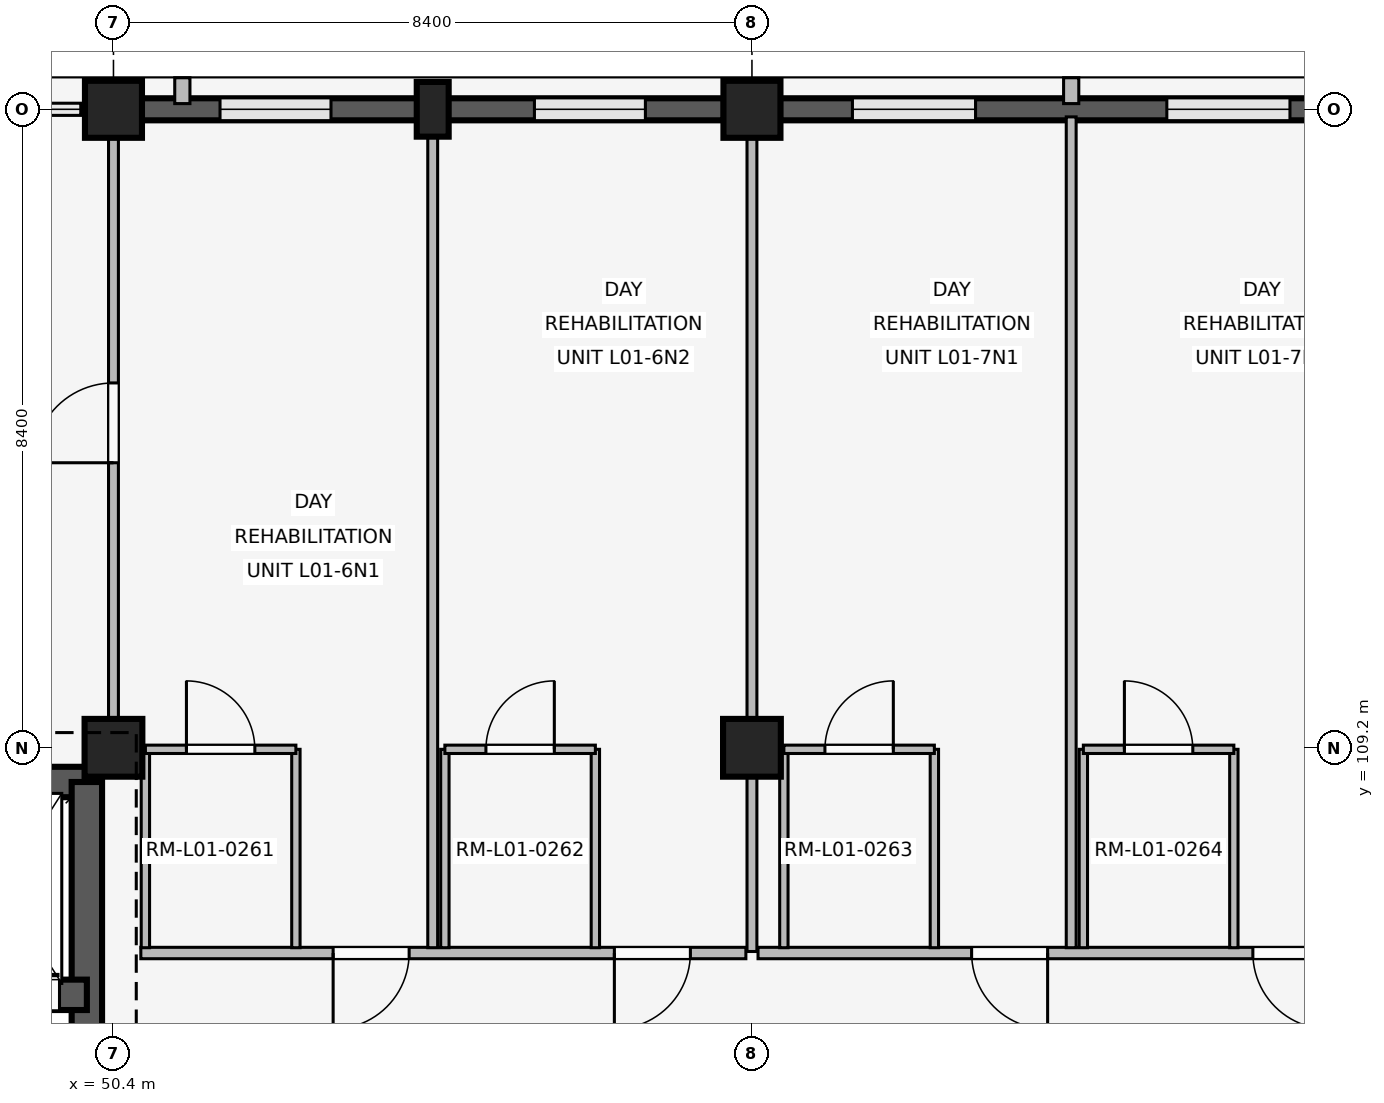
"""IFC4 building model, lengths in metres.
Left out: names, types, materials, properties, quantities, classifications, styles, units other than length and angle.
Written with IfcOpenShell. Run it as: python <this file> out.ifc"""

import sys

from ifc_helpers import new_model, si_unit, direction, frame, frame_2d, origin, origin_2d, place, context, subcontext, project, spatial, rectangle, extrude, element, fill, save


model = new_model("IFC4")
c1 = context("Model", 3, precision=1e-05, world=origin(), true_north=direction((0.0, 1.0)))
c2 = subcontext(c1, "Body", "Model", "MODEL_VIEW")
j1 = project(units=[si_unit("LENGTHUNIT", "METRE"), si_unit("PLANEANGLEUNIT", "RADIAN")], contexts=[c1])
p1 = place(None, origin())
s1 = spatial("IfcSite", under=j1, at=p1, CompositionType="ELEMENT")
p2 = place(p1, origin())
s2 = spatial("IfcBuilding", under=s1, at=p2, CompositionType="ELEMENT")
p3 = place(p2, frame((0.0, 0.0, 4.8)))
s3 = spatial("IfcBuildingStorey", under=s2, at=p3, CompositionType="ELEMENT", Elevation=4.8)
p4 = place(p3, frame((50.4, 109.2, 0.0), z_axis=(0.0, 0.0, 1.0), x_axis=(1.0, 0.0, 0.0)))
e1 = element("IfcColumn", 1, at=p4, inside=s3, PredefinedType="COLUMN", context=c2, shape_type="SweptSolid", body=[
    extrude(rectangle(XDim=0.76, YDim=0.76, at=origin_2d()), origin(), (0.0, 0.0, 1.0), 3.3),
])
p5 = place(p3, frame((50.4, 117.6, 0.0), z_axis=(0.0, 0.0, 1.0), x_axis=(1.0, 0.0, 0.0)))
e2 = element("IfcColumn", 2, at=p5, inside=s3, PredefinedType="COLUMN", context=c2, shape_type="SweptSolid", body=[
    extrude(rectangle(XDim=0.75, YDim=0.75, at=origin_2d()), origin(), (0.0, 0.0, 1.0), 3.3),
])
p6 = place(p3, frame((58.8, 109.2, 0.0), z_axis=(0.0, 0.0, 1.0), x_axis=(1.0, 0.0, 0.0)))
e3 = element("IfcColumn", 3, at=p6, inside=s3, PredefinedType="COLUMN", context=c2, shape_type="SweptSolid", body=[
    extrude(rectangle(XDim=0.76, YDim=0.76, at=origin_2d()), origin(), (0.0, 0.0, 1.0), 3.3),
])
p7 = place(p3, frame((58.8, 117.6, 0.0), z_axis=(0.0, 0.0, 1.0), x_axis=(1.0, 0.0, 0.0)))
e4 = element("IfcColumn", 4, at=p7, inside=s3, PredefinedType="COLUMN", context=c2, shape_type="SweptSolid", body=[
    extrude(rectangle(XDim=0.75, YDim=0.75, at=origin_2d()), origin(), (0.0, 0.0, 1.0), 3.3),
])
p8 = place(p3, frame((54.6, 117.6, 0.0), z_axis=(0.0, 0.0, 1.0), x_axis=(1.0, 0.0, 0.0)))
e5 = element("IfcColumn", 5, at=p8, inside=s3, PredefinedType="PILASTER", context=c2, shape_type="SweptSolid", body=[
    extrude(rectangle(XDim=0.42, YDim=0.72, at=origin_2d()), origin(), (0.0, 0.0, 1.0), 3.3),
])
p9 = place(p3, frame((50.77, 117.6, 0.0), z_axis=(0.0, 0.0, 1.0), x_axis=(1.0, 0.0, 0.0)))
e6 = element("IfcWall", 6, at=p9, inside=s3, PredefinedType="SOLIDWALL", context=c2, shape_type="SweptSolid", body=[
    extrude(rectangle(XDim=7.66, YDim=0.29, at=frame_2d((3.83, 0.0))), origin(), (0.0, 0.0, 1.0), 2.42),
])
p10 = place(p9, frame((1.032, 0.0, 0.85)))
e7 = element("IfcOpeningElement", 7, at=p10, cuts=e6, PredefinedType="OPENING", context=c2, shape_type="SweptSolid", body=[
    extrude(rectangle(XDim=1.46, YDim=0.85, at=frame_2d((0.73, 0.425))), frame((0.0, 0.155, 0.0), z_axis=(0.0, -1.0, 0.0), x_axis=(1.0, 0.0, 0.0)), (0.0, 0.0, 1.0), 0.31),
])
p11 = place(p9, frame((5.168, 0.0, 0.85)))
e8 = element("IfcOpeningElement", 8, at=p11, cuts=e6, PredefinedType="OPENING", context=c2, shape_type="SweptSolid", body=[
    extrude(rectangle(XDim=1.46, YDim=0.85, at=frame_2d((0.73, 0.425))), frame((0.0, 0.155, 0.0), z_axis=(0.0, -1.0, 0.0), x_axis=(1.0, 0.0, 0.0)), (0.0, 0.0, 1.0), 0.31),
])
p12 = place(p3, frame((51.306, 117.675, 0.0), z_axis=(0.0, 0.0, 1.0), x_axis=(0.0, 1.0, 0.0)))
e9 = element("IfcWall", 9, at=p12, inside=s3, PredefinedType="ELEMENTEDWALL", context=c2, shape_type="SweptSolid", body=[
    extrude(rectangle(XDim=0.34, YDim=0.2, at=frame_2d((0.17, 0.0))), origin(), (0.0, 0.0, 1.0), 2.4),
])
p13 = place(p3, frame((59.17, 117.6, 0.0), z_axis=(0.0, 0.0, 1.0), x_axis=(1.0, 0.0, 0.0)))
e10 = element("IfcWall", 10, at=p13, inside=s3, PredefinedType="SOLIDWALL", context=c2, shape_type="SweptSolid", body=[
    extrude(rectangle(XDim=7.66, YDim=0.29, at=frame_2d((3.83, 0.0))), origin(), (0.0, 0.0, 1.0), 2.42),
])
p14 = place(p13, frame((0.952, 0.0, 0.85)))
e11 = element("IfcOpeningElement", 11, at=p14, cuts=e10, PredefinedType="OPENING", context=c2, shape_type="SweptSolid", body=[
    extrude(rectangle(XDim=1.62, YDim=0.95, at=frame_2d((0.81, 0.475))), frame((0.0, 0.155, 0.0), z_axis=(0.0, -1.0, 0.0), x_axis=(1.0, 0.0, 0.0)), (0.0, 0.0, 1.0), 0.31),
])
p15 = place(p13, frame((5.088, 0.0, 0.85)))
e12 = element("IfcOpeningElement", 12, at=p15, cuts=e10, PredefinedType="OPENING", context=c2, shape_type="SweptSolid", body=[
    extrude(rectangle(XDim=1.62, YDim=0.95, at=frame_2d((0.81, 0.475))), frame((0.0, 0.155, 0.0), z_axis=(0.0, -1.0, 0.0), x_axis=(1.0, 0.0, 0.0)), (0.0, 0.0, 1.0), 0.31),
])
p16 = place(p3, frame((63.0, 117.675, 0.0), z_axis=(0.0, 0.0, 1.0), x_axis=(0.0, 1.0, 0.0)))
e13 = element("IfcWall", 13, at=p16, inside=s3, PredefinedType="ELEMENTEDWALL", context=c2, shape_type="SweptSolid", body=[
    extrude(rectangle(XDim=0.34, YDim=0.2, at=frame_2d((0.17, 0.0))), origin(), (0.0, 0.0, 1.0), 2.4),
])
p17 = place(p3, frame((42.55, 108.75, 0.0), z_axis=(0.0, 0.0, 1.0), x_axis=(1.0, 0.0, 0.0)))
e14 = element("IfcWall", 14, at=p17, inside=s3, PredefinedType="SHEAR", context=c2, shape_type="SweptSolid", body=[
    extrude(rectangle(XDim=7.5, YDim=0.4, at=frame_2d((3.75, 0.0))), origin(), (0.0, 0.0, 1.0), 3.02),
])
p18 = place(p3, frame((50.05, 101.2, 0.0), z_axis=(0.0, 0.0, 1.0), x_axis=(0.0, 1.0, 0.0)))
e15 = element("IfcWall", 15, at=p18, inside=s3, PredefinedType="SHEAR", context=c2, shape_type="SweptSolid", body=[
    extrude(rectangle(XDim=7.55, YDim=0.4, at=frame_2d((3.775, 0.0))), origin(), (0.0, 0.0, 1.0), 3.02),
])
p19 = place(p18, frame((2.4, 0.0, 0.0)))
e16 = element("IfcOpeningElement", 16, at=p19, cuts=e15, PredefinedType="OPENING", context=c2, shape_type="SweptSolid", body=[
    extrude(rectangle(XDim=1.2, YDim=2.2, at=frame_2d((0.6, 1.1))), frame((0.0, 0.21, 0.0), z_axis=(0.0, -1.0, 0.0), x_axis=(1.0, 0.0, 0.0)), (0.0, 0.0, 1.0), 0.42),
])
p20 = place(p3, frame((46.25, 105.95, 0.0), z_axis=(0.0, 0.0, 1.0), x_axis=(1.0, 0.0, 0.0)))
e17 = element("IfcWall", 17, at=p20, inside=s3, PredefinedType="SHEAR", context=c2, shape_type="SweptSolid", body=[
    extrude(rectangle(XDim=3.8, YDim=0.4, at=frame_2d((1.9, 0.0))), origin(), (0.0, 0.0, 1.0), 3.02),
])
p21 = place(p20, frame((0.32, 0.0, 0.0)))
e18 = element("IfcOpeningElement", 18, at=p21, cuts=e17, PredefinedType="OPENING", context=c2, shape_type="SweptSolid", body=[
    extrude(rectangle(XDim=1.35, YDim=2.25, at=frame_2d((0.675, 1.125))), frame((0.0, 0.21, 0.0), z_axis=(0.0, -1.0, 0.0), x_axis=(1.0, 0.0, 0.0)), (0.0, 0.0, 1.0), 0.42),
])
p22 = place(p20, frame((2.04, 0.0, 0.0)))
e19 = element("IfcOpeningElement", 19, at=p22, cuts=e17, PredefinedType="OPENING", context=c2, shape_type="SweptSolid", body=[
    extrude(rectangle(XDim=1.4, YDim=2.25, at=frame_2d((0.7, 1.125))), frame((0.0, 0.21, 0.0), z_axis=(0.0, -1.0, 0.0), x_axis=(1.0, 0.0, 0.0)), (0.0, 0.0, 1.0), 0.42),
])
p23 = place(p3, frame((50.4, 109.55, 0.0), z_axis=(0.0, 0.0, 1.0), x_axis=(0.0, 1.0, 0.0)))
e20 = element("IfcWall", 20, at=p23, inside=s3, PredefinedType="PARTITIONING", context=c2, shape_type="SweptSolid", body=[
    extrude(rectangle(XDim=7.91, YDim=0.13, at=frame_2d((3.955, 0.0))), origin(), (0.0, 0.0, 1.0), 2.4),
])
p24 = place(p23, frame((3.4, 0.0, 0.0)))
e21 = element("IfcOpeningElement", 21, at=p24, cuts=e20, PredefinedType="OPENING", context=c2, shape_type="SweptSolid", body=[
    extrude(rectangle(XDim=1.05, YDim=2.2, at=frame_2d((0.525, 1.1))), frame((0.0, 0.075, 0.0), z_axis=(0.0, -1.0, 0.0), x_axis=(1.0, 0.0, 0.0)), (0.0, 0.0, 1.0), 0.15),
])
p25 = place(p3, frame((58.72, 106.5, 0.0), z_axis=(0.0, 0.0, 1.0), x_axis=(-1.0, 0.0, 0.0)))
e22 = element("IfcWall", 22, at=p25, inside=s3, PredefinedType="PARTITIONING", context=c2, shape_type="SweptSolid", body=[
    extrude(rectangle(XDim=7.96, YDim=0.15, at=frame_2d((3.98, 0.0))), origin(), (0.0, 0.0, 1.0), 2.4),
])
p26 = place(p25, frame((0.73, 0.0, 0.0)))
e23 = element("IfcOpeningElement", 23, at=p26, cuts=e22, PredefinedType="OPENING", context=c2, shape_type="SweptSolid", body=[
    extrude(rectangle(XDim=1.0, YDim=2.15, at=frame_2d((0.5, 1.075))), frame((0.0, 0.085, 0.0), z_axis=(0.0, -1.0, 0.0), x_axis=(1.0, 0.0, 0.0)), (0.0, 0.0, 1.0), 0.17),
])
p27 = place(p25, frame((4.43, 0.0, 0.0)))
e24 = element("IfcOpeningElement", 24, at=p27, cuts=e22, PredefinedType="OPENING", context=c2, shape_type="SweptSolid", body=[
    extrude(rectangle(XDim=1.0, YDim=2.15, at=frame_2d((0.5, 1.075))), frame((0.0, 0.085, 0.0), z_axis=(0.0, -1.0, 0.0), x_axis=(1.0, 0.0, 0.0)), (0.0, 0.0, 1.0), 0.17),
])
p28 = place(p3, frame((54.6, 106.57, 0.0), z_axis=(0.0, 0.0, 1.0), x_axis=(0.0, 1.0, 0.0)))
e25 = element("IfcWall", 25, at=p28, inside=s3, PredefinedType="PARTITIONING", context=c2, shape_type="SweptSolid", body=[
    extrude(rectangle(XDim=10.93, YDim=0.13, at=frame_2d((5.465, 0.0))), origin(), (0.0, 0.0, 1.0), 2.4),
])
for number, where, z_axis, x_axis in (
    (26, (50.82, 106.57, 0.0), (0.0, 0.0, 1.0), (0.0, 1.0, 0.0)),
    (27, (52.8, 106.57, 0.0), (0.0, 0.0, 1.0), (0.0, 1.0, 0.0)),
):
    element("IfcWall", number, at=place(p3, frame(where, z_axis=z_axis, x_axis=x_axis)), inside=s3, PredefinedType="PARTITIONING", context=c2, shape_type="SweptSolid", body=[
        extrude(rectangle(XDim=2.61, YDim=0.11, at=frame_2d((1.305, 0.0))), origin(), (0.0, 0.0, 1.0), 2.4),
    ])
p29 = place(p3, frame((50.82, 109.18, 0.0), z_axis=(0.0, 0.0, 1.0), x_axis=(1.0, 0.0, 0.0)))
e28 = element("IfcWall", 28, at=p29, inside=s3, PredefinedType="PARTITIONING", context=c2, shape_type="SweptSolid", body=[
    extrude(rectangle(XDim=1.98, YDim=0.11, at=frame_2d((0.99, 0.0))), origin(), (0.0, 0.0, 1.0), 2.4),
])
p30 = place(p29, frame((0.54, 0.0, 0.0)))
e29 = element("IfcOpeningElement", 29, at=p30, cuts=e28, PredefinedType="OPENING", context=c2, shape_type="SweptSolid", body=[
    extrude(rectangle(XDim=0.9, YDim=2.1, at=frame_2d((0.45, 1.05))), frame((0.0, 0.065, 0.0), z_axis=(0.0, -1.0, 0.0), x_axis=(1.0, 0.0, 0.0)), (0.0, 0.0, 1.0), 0.13),
])
for number, where, z_axis, x_axis in (
    (30, (54.76, 106.57, 0.0), (0.0, 0.0, 1.0), (0.0, 1.0, 0.0)),
    (31, (56.74, 106.57, 0.0), (0.0, 0.0, 1.0), (0.0, 1.0, 0.0)),
):
    element("IfcWall", number, at=place(p3, frame(where, z_axis=z_axis, x_axis=x_axis)), inside=s3, PredefinedType="PARTITIONING", context=c2, shape_type="SweptSolid", body=[
        extrude(rectangle(XDim=2.61, YDim=0.11, at=frame_2d((1.305, 0.0))), origin(), (0.0, 0.0, 1.0), 2.4),
    ])
p31 = place(p3, frame((54.76, 109.18, 0.0), z_axis=(0.0, 0.0, 1.0), x_axis=(1.0, 0.0, 0.0)))
e32 = element("IfcWall", 32, at=p31, inside=s3, PredefinedType="PARTITIONING", context=c2, shape_type="SweptSolid", body=[
    extrude(rectangle(XDim=1.98, YDim=0.11, at=frame_2d((0.99, 0.0))), origin(), (0.0, 0.0, 1.0), 2.4),
])
p32 = place(p31, frame((0.54, 0.0, 0.0)))
e33 = element("IfcOpeningElement", 33, at=p32, cuts=e32, PredefinedType="OPENING", context=c2, shape_type="SweptSolid", body=[
    extrude(rectangle(XDim=0.9, YDim=2.1, at=frame_2d((0.45, 1.05))), frame((0.0, 0.065, 0.0), z_axis=(0.0, -1.0, 0.0), x_axis=(1.0, 0.0, 0.0)), (0.0, 0.0, 1.0), 0.13),
])
p33 = place(p3, frame((58.8, 106.52, 0.0), z_axis=(0.0, 0.0, 1.0), x_axis=(0.0, 1.0, 0.0)))
e34 = element("IfcWall", 34, at=p33, inside=s3, PredefinedType="PARTITIONING", context=c2, shape_type="SweptSolid", body=[
    extrude(rectangle(XDim=10.94, YDim=0.13, at=frame_2d((5.47, 0.0))), origin(), (0.0, 0.0, 1.0), 2.4),
])
p34 = place(p3, frame((67.12, 106.5, 0.0), z_axis=(0.0, 0.0, 1.0), x_axis=(-1.0, 0.0, 0.0)))
e35 = element("IfcWall", 35, at=p34, inside=s3, PredefinedType="PARTITIONING", context=c2, shape_type="SweptSolid", body=[
    extrude(rectangle(XDim=8.24, YDim=0.15, at=frame_2d((4.12, 0.0))), origin(), (0.0, 0.0, 1.0), 2.4),
])
p35 = place(p34, frame((0.73, 0.0, 0.0)))
e36 = element("IfcOpeningElement", 36, at=p35, cuts=e35, PredefinedType="OPENING", context=c2, shape_type="SweptSolid", body=[
    extrude(rectangle(XDim=1.0, YDim=2.15, at=frame_2d((0.5, 1.075))), frame((0.0, 0.085, 0.0), z_axis=(0.0, -1.0, 0.0), x_axis=(1.0, 0.0, 0.0)), (0.0, 0.0, 1.0), 0.17),
])
p36 = place(p34, frame((4.43, 0.0, 0.0)))
e37 = element("IfcOpeningElement", 37, at=p36, cuts=e35, PredefinedType="OPENING", context=c2, shape_type="SweptSolid", body=[
    extrude(rectangle(XDim=1.0, YDim=2.15, at=frame_2d((0.5, 1.075))), frame((0.0, 0.085, 0.0), z_axis=(0.0, -1.0, 0.0), x_axis=(1.0, 0.0, 0.0)), (0.0, 0.0, 1.0), 0.17),
])
p37 = place(p3, frame((63.0, 106.57, 0.0), z_axis=(0.0, 0.0, 1.0), x_axis=(0.0, 1.0, 0.0)))
e38 = element("IfcWall", 38, at=p37, inside=s3, PredefinedType="PARTITIONING", context=c2, shape_type="SweptSolid", body=[
    extrude(rectangle(XDim=10.93, YDim=0.13, at=frame_2d((5.465, 0.0))), origin(), (0.0, 0.0, 1.0), 2.4),
])
for number, where, z_axis, x_axis in (
    (39, (59.22, 106.57, 0.0), (0.0, 0.0, 1.0), (0.0, 1.0, 0.0)),
    (40, (61.2, 106.57, 0.0), (0.0, 0.0, 1.0), (0.0, 1.0, 0.0)),
):
    element("IfcWall", number, at=place(p3, frame(where, z_axis=z_axis, x_axis=x_axis)), inside=s3, PredefinedType="PARTITIONING", context=c2, shape_type="SweptSolid", body=[
        extrude(rectangle(XDim=2.61, YDim=0.11, at=frame_2d((1.305, 0.0))), origin(), (0.0, 0.0, 1.0), 2.4),
    ])
p38 = place(p3, frame((59.22, 109.18, 0.0), z_axis=(0.0, 0.0, 1.0), x_axis=(1.0, 0.0, 0.0)))
e41 = element("IfcWall", 41, at=p38, inside=s3, PredefinedType="PARTITIONING", context=c2, shape_type="SweptSolid", body=[
    extrude(rectangle(XDim=1.98, YDim=0.11, at=frame_2d((0.99, 0.0))), origin(), (0.0, 0.0, 1.0), 2.4),
])
p39 = place(p38, frame((0.54, 0.0, 0.0)))
e42 = element("IfcOpeningElement", 42, at=p39, cuts=e41, PredefinedType="OPENING", context=c2, shape_type="SweptSolid", body=[
    extrude(rectangle(XDim=0.9, YDim=2.1, at=frame_2d((0.45, 1.05))), frame((0.0, 0.065, 0.0), z_axis=(0.0, -1.0, 0.0), x_axis=(1.0, 0.0, 0.0)), (0.0, 0.0, 1.0), 0.13),
])
for number, where, z_axis, x_axis in (
    (43, (63.16, 106.57, 0.0), (0.0, 0.0, 1.0), (0.0, 1.0, 0.0)),
    (44, (65.14, 106.57, 0.0), (0.0, 0.0, 1.0), (0.0, 1.0, 0.0)),
):
    element("IfcWall", number, at=place(p3, frame(where, z_axis=z_axis, x_axis=x_axis)), inside=s3, PredefinedType="PARTITIONING", context=c2, shape_type="SweptSolid", body=[
        extrude(rectangle(XDim=2.61, YDim=0.11, at=frame_2d((1.305, 0.0))), origin(), (0.0, 0.0, 1.0), 2.4),
    ])
p40 = place(p3, frame((63.16, 109.18, 0.0), z_axis=(0.0, 0.0, 1.0), x_axis=(1.0, 0.0, 0.0)))
e45 = element("IfcWall", 45, at=p40, inside=s3, PredefinedType="PARTITIONING", context=c2, shape_type="SweptSolid", body=[
    extrude(rectangle(XDim=1.98, YDim=0.11, at=frame_2d((0.99, 0.0))), origin(), (0.0, 0.0, 1.0), 2.4),
])
p41 = place(p40, frame((0.54, 0.0, 0.0)))
e46 = element("IfcOpeningElement", 46, at=p41, cuts=e45, PredefinedType="OPENING", context=c2, shape_type="SweptSolid", body=[
    extrude(rectangle(XDim=0.9, YDim=2.1, at=frame_2d((0.45, 1.05))), frame((0.0, 0.065, 0.0), z_axis=(0.0, -1.0, 0.0), x_axis=(1.0, 0.0, 0.0)), (0.0, 0.0, 1.0), 0.13),
])
p42 = place(p10, origin())
e47 = element("IfcWindow", 47, at=p42, inside=s3, PartitioningType="SINGLE_PANEL", PredefinedType="WINDOW", context=c2, shape_type="SweptSolid", body=[
    extrude(rectangle(XDim=1.46, YDim=0.85, at=frame_2d((0.73, 0.425))), frame((0.0, 0.03, 0.0), z_axis=(0.0, -1.0, 0.0), x_axis=(1.0, 0.0, 0.0)), (0.0, 0.0, 1.0), 0.06),
])
fill(e7, e47)
p43 = place(p11, origin())
e48 = element("IfcWindow", 48, at=p43, inside=s3, PartitioningType="SINGLE_PANEL", PredefinedType="WINDOW", context=c2, shape_type="SweptSolid", body=[
    extrude(rectangle(XDim=1.46, YDim=0.85, at=frame_2d((0.73, 0.425))), frame((0.0, 0.03, 0.0), z_axis=(0.0, -1.0, 0.0), x_axis=(1.0, 0.0, 0.0)), (0.0, 0.0, 1.0), 0.06),
])
fill(e8, e48)
p44 = place(p14, origin())
e49 = element("IfcWindow", 49, at=p44, inside=s3, PartitioningType="SINGLE_PANEL", PredefinedType="WINDOW", context=c2, shape_type="SweptSolid", body=[
    extrude(rectangle(XDim=1.62, YDim=0.95, at=frame_2d((0.81, 0.475))), frame((0.0, 0.03, 0.0), z_axis=(0.0, -1.0, 0.0), x_axis=(1.0, 0.0, 0.0)), (0.0, 0.0, 1.0), 0.06),
])
fill(e11, e49)
p45 = place(p15, origin())
e50 = element("IfcWindow", 50, at=p45, inside=s3, PartitioningType="SINGLE_PANEL", PredefinedType="WINDOW", context=c2, shape_type="SweptSolid", body=[
    extrude(rectangle(XDim=1.62, YDim=0.95, at=frame_2d((0.81, 0.475))), frame((0.0, 0.03, 0.0), z_axis=(0.0, -1.0, 0.0), x_axis=(1.0, 0.0, 0.0)), (0.0, 0.0, 1.0), 0.06),
])
fill(e12, e50)
p46 = place(p22, origin())
e51 = element("IfcDoor", 51, at=p46, inside=s3, OperationType="SLIDING_TO_LEFT", PredefinedType="DOOR", context=c2, shape_type="SweptSolid", body=[
    extrude(rectangle(XDim=1.4, YDim=2.25, at=frame_2d((0.7, 1.125))), frame((0.0, 0.025, 0.0), z_axis=(0.0, -1.0, 0.0), x_axis=(1.0, 0.0, 0.0)), (0.0, 0.0, 1.0), 0.05),
])
fill(e19, e51)
p47 = place(p24, origin())
e52 = element("IfcDoor", 52, at=p47, inside=s3, OperationType="SINGLE_SWING_LEFT", PredefinedType="DOOR", context=c2, shape_type="SweptSolid", body=[
    extrude(rectangle(XDim=1.05, YDim=2.2, at=frame_2d((0.525, 1.1))), frame((0.0, 0.025, 0.0), z_axis=(0.0, -1.0, 0.0), x_axis=(1.0, 0.0, 0.0)), (0.0, 0.0, 1.0), 0.05),
])
fill(e21, e52)
p48 = place(p26, origin())
e53 = element("IfcDoor", 53, at=p48, inside=s3, OperationType="SINGLE_SWING_RIGHT", PredefinedType="DOOR", context=c2, shape_type="SweptSolid", body=[
    extrude(rectangle(XDim=1.0, YDim=2.15, at=frame_2d((0.5, 1.075))), frame((0.0, 0.025, 0.0), z_axis=(0.0, -1.0, 0.0), x_axis=(1.0, 0.0, 0.0)), (0.0, 0.0, 1.0), 0.05),
])
fill(e23, e53)
p49 = place(p27, origin())
e54 = element("IfcDoor", 54, at=p49, inside=s3, OperationType="SINGLE_SWING_RIGHT", PredefinedType="DOOR", context=c2, shape_type="SweptSolid", body=[
    extrude(rectangle(XDim=1.0, YDim=2.15, at=frame_2d((0.5, 1.075))), frame((0.0, 0.025, 0.0), z_axis=(0.0, -1.0, 0.0), x_axis=(1.0, 0.0, 0.0)), (0.0, 0.0, 1.0), 0.05),
])
fill(e24, e54)
p50 = place(p30, origin())
e55 = element("IfcDoor", 55, at=p50, inside=s3, OperationType="SINGLE_SWING_LEFT", PredefinedType="DOOR", context=c2, shape_type="SweptSolid", body=[
    extrude(rectangle(XDim=0.9, YDim=2.1, at=frame_2d((0.45, 1.05))), frame((0.0, 0.025, 0.0), z_axis=(0.0, -1.0, 0.0), x_axis=(1.0, 0.0, 0.0)), (0.0, 0.0, 1.0), 0.05),
])
fill(e29, e55)
p51 = place(p32, origin())
e56 = element("IfcDoor", 56, at=p51, inside=s3, OperationType="SINGLE_SWING_RIGHT", PredefinedType="DOOR", context=c2, shape_type="SweptSolid", body=[
    extrude(rectangle(XDim=0.9, YDim=2.1, at=frame_2d((0.45, 1.05))), frame((0.0, 0.025, 0.0), z_axis=(0.0, -1.0, 0.0), x_axis=(1.0, 0.0, 0.0)), (0.0, 0.0, 1.0), 0.05),
])
fill(e33, e56)
p52 = place(p35, origin())
e57 = element("IfcDoor", 57, at=p52, inside=s3, OperationType="SINGLE_SWING_LEFT", PredefinedType="DOOR", context=c2, shape_type="SweptSolid", body=[
    extrude(rectangle(XDim=1.0, YDim=2.15, at=frame_2d((0.5, 1.075))), frame((0.0, 0.025, 0.0), z_axis=(0.0, -1.0, 0.0), x_axis=(1.0, 0.0, 0.0)), (0.0, 0.0, 1.0), 0.05),
])
fill(e36, e57)
p53 = place(p36, origin())
e58 = element("IfcDoor", 58, at=p53, inside=s3, OperationType="SINGLE_SWING_LEFT", PredefinedType="DOOR", context=c2, shape_type="SweptSolid", body=[
    extrude(rectangle(XDim=1.0, YDim=2.15, at=frame_2d((0.5, 1.075))), frame((0.0, 0.025, 0.0), z_axis=(0.0, -1.0, 0.0), x_axis=(1.0, 0.0, 0.0)), (0.0, 0.0, 1.0), 0.05),
])
fill(e37, e58)
p54 = place(p39, origin())
e59 = element("IfcDoor", 59, at=p54, inside=s3, OperationType="SINGLE_SWING_RIGHT", PredefinedType="DOOR", context=c2, shape_type="SweptSolid", body=[
    extrude(rectangle(XDim=0.9, YDim=2.1, at=frame_2d((0.45, 1.05))), frame((0.0, 0.025, 0.0), z_axis=(0.0, -1.0, 0.0), x_axis=(1.0, 0.0, 0.0)), (0.0, 0.0, 1.0), 0.05),
])
fill(e42, e59)
p55 = place(p41, origin())
e60 = element("IfcDoor", 60, at=p55, inside=s3, OperationType="SINGLE_SWING_LEFT", PredefinedType="DOOR", context=c2, shape_type="SweptSolid", body=[
    extrude(rectangle(XDim=0.9, YDim=2.1, at=frame_2d((0.45, 1.05))), frame((0.0, 0.025, 0.0), z_axis=(0.0, -1.0, 0.0), x_axis=(1.0, 0.0, 0.0)), (0.0, 0.0, 1.0), 0.05),
])
fill(e46, e60)
save(model, sys.argv[1])
